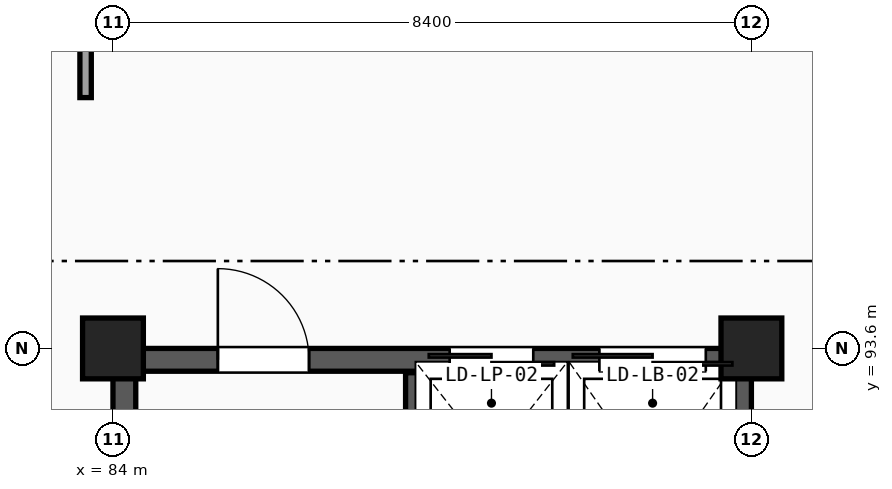
"""IFC4 building model, lengths in metres.
Left out: names, types, materials, properties, quantities, classifications, styles, units other than length and angle.
Written with IfcOpenShell. Run it as: python <this file> out.ifc"""

import sys

from ifc_helpers import new_model, si_unit, direction, frame, frame_2d, origin, origin_2d, place, context, subcontext, project, spatial, rectangle, extrude, element, fill, save


model = new_model("IFC4")
c1 = context("Model", 3, precision=1e-05, world=origin(), true_north=direction((0.0, 1.0)))
c2 = subcontext(c1, "Body", "Model", "MODEL_VIEW")
j1 = project(units=[si_unit("LENGTHUNIT", "METRE"), si_unit("PLANEANGLEUNIT", "RADIAN")], contexts=[c1])
p1 = place(None, origin())
s1 = spatial("IfcSite", under=j1, at=p1, CompositionType="ELEMENT")
p2 = place(p1, origin())
s2 = spatial("IfcBuilding", under=s1, at=p2, CompositionType="ELEMENT")
p3 = place(p2, frame((0.0, 0.0, -5.1)))
s3 = spatial("IfcBuildingStorey", under=s2, at=p3, CompositionType="ELEMENT", Elevation=-5.1)
for number, where, z_axis, x_axis in (
    (1, (84.0, 93.6, -0.22), (0.0, 0.0, 1.0), (1.0, 0.0, 0.0)),
    (2, (92.4, 93.6, -0.22), (0.0, 0.0, 1.0), (1.0, 0.0, 0.0)),
):
    element("IfcColumn", number, at=place(p3, frame(where, z_axis=z_axis, x_axis=x_axis)), inside=s3, PredefinedType="COLUMN", context=c2, shape_type="SweptSolid", body=[
        extrude(rectangle(XDim=0.8, YDim=0.8, at=origin_2d()), origin(), (0.0, 0.0, 1.0), 5.32),
    ])
p4 = place(p3, frame((84.0, 93.45, -0.22), z_axis=(0.0, 0.0, 1.0), x_axis=(1.0, 0.0, 0.0)))
e3 = element("IfcWall", 3, at=p4, inside=s3, PredefinedType="SHEAR", context=c2, shape_type="SweptSolid", body=[
    extrude(rectangle(XDim=8.4, YDim=0.3, at=frame_2d((4.2, 0.0))), origin(), (0.0, 0.0, 1.0), 5.04),
])
p5 = place(p4, frame((1.38, 0.0, 0.22)))
e4 = element("IfcOpeningElement", 4, at=p5, cuts=e3, PredefinedType="OPENING", context=c2, shape_type="SweptSolid", body=[
    extrude(rectangle(XDim=1.2, YDim=2.15, at=frame_2d((0.6, 1.075))), frame((0.0, 0.16, 0.0), z_axis=(0.0, -1.0, 0.0), x_axis=(1.0, 0.0, 0.0)), (0.0, 0.0, 1.0), 0.32),
])
p6 = place(p4, frame((4.43, 0.0, 0.22)))
e5 = element("IfcOpeningElement", 5, at=p6, cuts=e3, PredefinedType="OPENING", context=c2, shape_type="SweptSolid", body=[
    extrude(rectangle(XDim=1.1, YDim=2.15, at=frame_2d((0.55, 1.075))), frame((0.0, 0.16, 0.0), z_axis=(0.0, -1.0, 0.0), x_axis=(1.0, 0.0, 0.0)), (0.0, 0.0, 1.0), 0.32),
])
p7 = place(p4, frame((6.4, 0.0, 0.22)))
e6 = element("IfcOpeningElement", 6, at=p7, cuts=e3, PredefinedType="OPENING", context=c2, shape_type="SweptSolid", body=[
    extrude(rectangle(XDim=1.4, YDim=2.2, at=frame_2d((0.7, 1.1))), frame((0.0, 0.16, 0.0), z_axis=(0.0, -1.0, 0.0), x_axis=(1.0, 0.0, 0.0)), (0.0, 0.0, 1.0), 0.32),
])
for number, where, z_axis, x_axis in (
    (7, (84.15, 86.22, -0.22), (0.0, 0.0, 1.0), (0.0, 1.0, 0.0)),
    (8, (92.25, 86.22, -0.22), (0.0, 0.0, 1.0), (0.0, 1.0, 0.0)),
):
    element("IfcWall", number, at=place(p3, frame(where, z_axis=z_axis, x_axis=x_axis)), inside=s3, PredefinedType="SHEAR", context=c2, shape_type="SweptSolid", body=[
        extrude(rectangle(XDim=7.08, YDim=0.3, at=frame_2d((3.54, 0.0))), origin(), (0.0, 0.0, 1.0), 5.04),
    ])
p8 = place(p3, frame((87.95, 86.24, -0.22), z_axis=(0.0, 0.0, 1.0), x_axis=(0.0, 1.0, 0.0)))
e9 = element("IfcWall", 9, at=p8, inside=s3, PredefinedType="SHEAR", context=c2, shape_type="SweptSolid", body=[
    extrude(rectangle(XDim=7.04, YDim=0.2, at=frame_2d((3.52, 0.0))), origin(), (0.0, 0.0, 1.0), 5.04),
])
p9 = place(p3, frame((89.94, 91.08, 0.0), z_axis=(0.0, 0.0, 1.0), x_axis=(0.0, 1.0, 0.0)))
e10 = element("IfcWall", 10, at=p9, inside=s3, PredefinedType="PARTITIONING", context=c2, shape_type="SweptSolid", body=[
    extrude(rectangle(XDim=2.14, YDim=0.2, at=frame_2d((1.07, 0.0))), origin(), (0.0, 0.0, 1.0), 4.31),
])
p10 = place(p3, frame((83.64, 96.9, 0.0), z_axis=(0.0, 0.0, 1.0), x_axis=(0.0, 1.0, 0.0)))
e11 = element("IfcWall", 11, at=p10, inside=s3, PredefinedType="PARTITIONING", context=c2, shape_type="SweptSolid", body=[
    extrude(rectangle(XDim=3.88, YDim=0.15, at=frame_2d((1.94, 0.0))), origin(), (0.0, 0.0, 1.0), 4.8),
])
p11 = place(p10, frame((1.415, 0.0, 0.0)))
e12 = element("IfcOpeningElement", 12, at=p11, cuts=e11, PredefinedType="OPENING", context=c2, shape_type="SweptSolid", body=[
    extrude(rectangle(XDim=1.05, YDim=2.15, at=frame_2d((0.525, 1.075))), frame((0.0, 0.085, 0.0), z_axis=(0.0, -1.0, 0.0), x_axis=(1.0, 0.0, 0.0)), (0.0, 0.0, 1.0), 0.17),
])
p12 = place(p5, origin())
e13 = element("IfcDoor", 13, at=p12, inside=s3, OperationType="SINGLE_SWING_LEFT", PredefinedType="DOOR", context=c2, shape_type="SweptSolid", body=[
    extrude(rectangle(XDim=1.2, YDim=2.15, at=frame_2d((0.6, 1.075))), frame((0.0, 0.025, 0.0), z_axis=(0.0, -1.0, 0.0), x_axis=(1.0, 0.0, 0.0)), (0.0, 0.0, 1.0), 0.05),
])
fill(e4, e13)
p13 = place(p6, origin())
e14 = element("IfcDoor", 14, at=p13, inside=s3, OperationType="DOUBLE_DOOR_SLIDING", PredefinedType="DOOR", context=c2, shape_type="SweptSolid", body=[
    extrude(rectangle(XDim=1.1, YDim=2.15, at=frame_2d((0.55, 1.075))), frame((0.0, 0.025, 0.0), z_axis=(0.0, -1.0, 0.0), x_axis=(1.0, 0.0, 0.0)), (0.0, 0.0, 1.0), 0.05),
])
fill(e5, e14)
p14 = place(p7, origin())
e15 = element("IfcDoor", 15, at=p14, inside=s3, OperationType="DOUBLE_DOOR_SLIDING", PredefinedType="DOOR", context=c2, shape_type="SweptSolid", body=[
    extrude(rectangle(XDim=1.4, YDim=2.2, at=frame_2d((0.7, 1.1))), frame((0.0, 0.025, 0.0), z_axis=(0.0, -1.0, 0.0), x_axis=(1.0, 0.0, 0.0)), (0.0, 0.0, 1.0), 0.05),
])
fill(e6, e15)
save(model, sys.argv[1])
